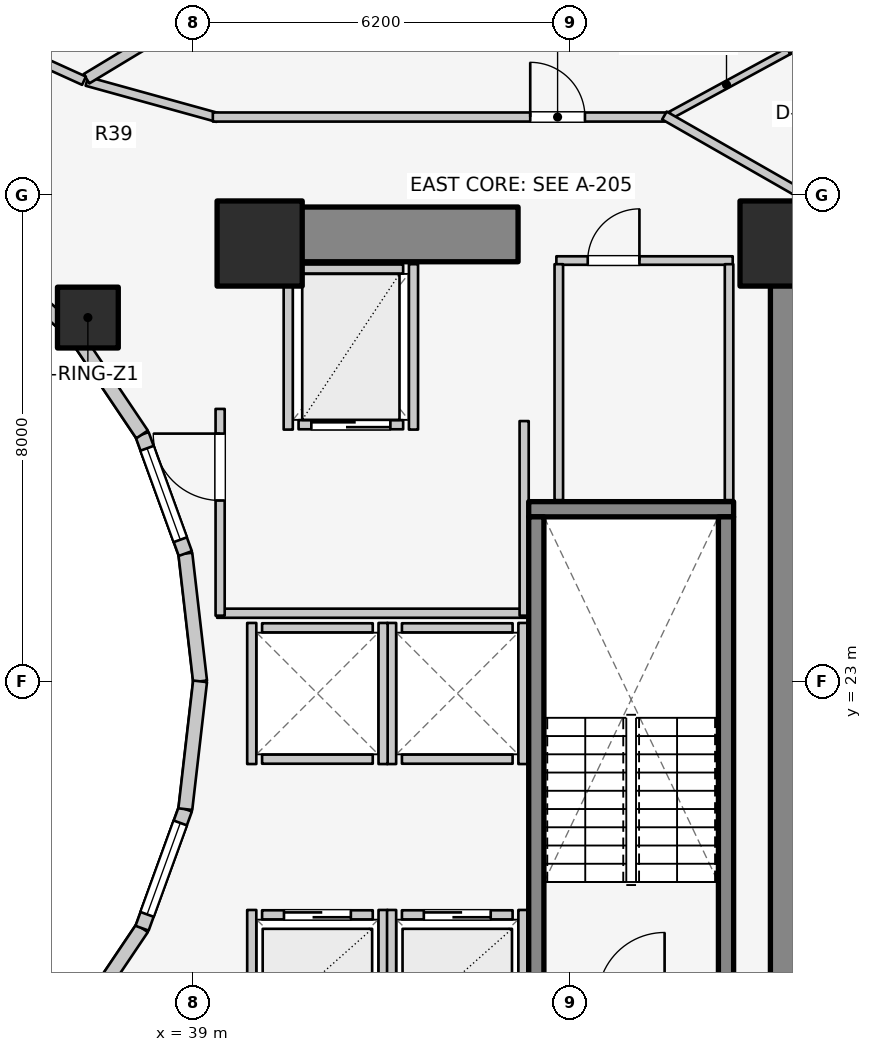
"""IFC4 building model, lengths in metres.
Left out: names, types, materials, properties, quantities, classifications, styles, units other than length and angle.
Written with IfcOpenShell. Run it as: python <this file> out.ifc"""

import sys

from ifc_helpers import new_model, si_unit, direction, frame, frame_2d, origin, origin_2d, place, context, subcontext, project, spatial, rectangle, extrude, element, fill, save


model = new_model("IFC4")
c1 = context("Model", 3, precision=1e-05, world=origin(), true_north=direction((0.0, 1.0)))
c2 = subcontext(c1, "Body", "Model", "MODEL_VIEW")
j1 = project(units=[si_unit("LENGTHUNIT", "METRE"), si_unit("PLANEANGLEUNIT", "RADIAN")], contexts=[c1])
p1 = place(None, origin())
s1 = spatial("IfcSite", under=j1, at=p1, CompositionType="ELEMENT")
p2 = place(p1, origin())
s2 = spatial("IfcBuilding", under=s1, at=p2, CompositionType="ELEMENT")
p3 = place(p2, frame((0.0, 0.0, 58.6)))
s3 = spatial("IfcBuildingStorey", under=s2, at=p3, CompositionType="ELEMENT", Elevation=58.6)
p4 = place(p3, frame((48.95, 17.05, 0.0), z_axis=(0.0, 0.0, 1.0), x_axis=(0.0, 1.0, 0.0)))
e1 = element("IfcWall", 1, at=p4, inside=s3, PredefinedType="SHEAR", context=c2, shape_type="SweptSolid", body=[
    extrude(rectangle(XDim=12.8, YDim=0.9, at=frame_2d((6.4, 0.0))), origin(), (0.0, 0.0, 1.0), 3.1),
])
p5 = place(p3, frame((39.85, 30.35, 0.0), z_axis=(0.0, 0.0, 1.0), x_axis=(1.0, 0.0, 0.0)))
e2 = element("IfcWall", 2, at=p5, inside=s3, PredefinedType="SHEAR", context=c2, shape_type="SweptSolid", body=[
    extrude(rectangle(XDim=4.5, YDim=0.9, at=frame_2d((2.25, 0.0))), origin(), (0.0, 0.0, 1.0), 3.1),
])
p6 = place(p3, frame((44.525, 25.83, 0.0), z_axis=(0.0, 0.0, 1.0), x_axis=(1.0, 0.0, 0.0)))
e3 = element("IfcWall", 3, at=p6, inside=s3, PredefinedType="SOLIDWALL", context=c2, shape_type="SweptSolid", body=[
    extrude(rectangle(XDim=3.37, YDim=0.25, at=frame_2d((1.685, 0.0))), origin(), (0.0, 0.0, 1.0), 3.1),
])
for number, where, z_axis, x_axis in (
    (4, (44.65, 17.895, 0.0), (0.0, 0.0, 1.0), (0.0, 1.0, 0.0)),
    (5, (47.77, 17.895, 0.0), (0.0, 0.0, 1.0), (0.0, 1.0, 0.0)),
):
    element("IfcWall", number, at=place(p3, frame(where, z_axis=z_axis, x_axis=x_axis)), inside=s3, PredefinedType="SOLIDWALL", context=c2, shape_type="SweptSolid", body=[
        extrude(rectangle(XDim=7.81, YDim=0.25, at=frame_2d((3.905, 0.0))), origin(), (0.0, 0.0, 1.0), 3.1),
    ])
for number, where, z_axis, x_axis in (
    (6, (48.7, 30.2, 0.0), (0.0, 0.0, 1.0), (1.0, 0.0, 0.0)),
    (7, (40.1, 30.2, 0.0), (0.0, 0.0, 1.0), (1.0, 0.0, 0.0)),
):
    element("IfcColumn", number, at=place(p3, frame(where, z_axis=z_axis, x_axis=x_axis)), inside=s3, PredefinedType="COLUMN", context=c2, shape_type="SweptSolid", body=[
        extrude(rectangle(XDim=1.4, YDim=1.4, at=origin_2d()), origin(), (0.0, 0.0, 1.0), 3.1),
    ])
p7 = place(p3, frame((37.275, 28.982, 0.0), z_axis=(0.0, 0.0, 1.0), x_axis=(1.0, 0.0, 0.0)))
e8 = element("IfcColumn", 8, at=p7, inside=s3, PredefinedType="COLUMN", context=c2, shape_type="SweptSolid", body=[
    extrude(rectangle(XDim=1.0, YDim=1.0, at=origin_2d()), origin(), (0.0, 0.0, 1.0), 3.1),
])
p8 = place(p3, frame((39.12, 23.0, 0.0), z_axis=(0.0, 0.0, 1.0), x_axis=(-0.114711713601, 0.993398823617, 0.0)))
e9 = element("IfcWall", 9, at=p8, inside=s3, PredefinedType="STANDARD", context=c2, shape_type="SweptSolid", body=[
    extrude(rectangle(XDim=2.115, YDim=0.23, at=frame_2d((1.058, 0.0))), origin(), (0.0, 0.0, 1.0), 2.84),
])
p9 = place(p3, frame((38.877, 25.102, 0.0), z_axis=(0.0, 0.0, 1.0), x_axis=(-0.341423187295, 0.93990968033, 0.0)))
e10 = element("IfcWall", 10, at=p9, inside=s3, PredefinedType="STANDARD", context=c2, shape_type="SweptSolid", body=[
    extrude(rectangle(XDim=2.084, YDim=0.23, at=frame_2d((1.042, 0.0))), origin(), (0.0, 0.0, 1.0), 2.84),
])
p10 = place(p9, frame((0.242, 0.0, 0.85)))
e11 = element("IfcOpeningElement", 11, at=p10, cuts=e10, PredefinedType="OPENING", context=c2, shape_type="SweptSolid", body=[
    extrude(rectangle(XDim=1.6, YDim=1.65, at=frame_2d((0.8, 0.825))), frame((0.0, 0.125, 0.0), z_axis=(0.0, -1.0, 0.0), x_axis=(1.0, 0.0, 0.0)), (0.0, 0.0, 1.0), 0.25),
])
p11 = place(p3, frame((38.166, 27.06, 0.0), z_axis=(0.0, 0.0, 1.0), x_axis=(-0.558197800898, 0.829707909492, 0.0)))
e12 = element("IfcWall", 12, at=p11, inside=s3, PredefinedType="STANDARD", context=c2, shape_type="SweptSolid", body=[
    extrude(rectangle(XDim=2.027, YDim=0.23, at=frame_2d((1.013, 0.0))), origin(), (0.0, 0.0, 1.0), 2.16),
])
p12 = place(p3, frame((37.035, 28.742, 0.0), z_axis=(0.0, 0.0, 1.0), x_axis=(-0.752576694707, 0.658504607869, 0.0)))
e13 = element("IfcWall", 13, at=p12, inside=s3, PredefinedType="STANDARD", context=c2, shape_type="SweptSolid", body=[
    extrude(rectangle(XDim=1.959, YDim=0.23, at=frame_2d((0.98, 0.0))), origin(), (0.0, 0.0, 1.0), 2.16),
])
p13 = place(p3, frame((37.035, 17.258, 0.0), z_axis=(0.0, 0.0, 1.0), x_axis=(0.558197800898, 0.829707909492, 0.0)))
e14 = element("IfcWall", 14, at=p13, inside=s3, PredefinedType="STANDARD", context=c2, shape_type="SweptSolid", body=[
    extrude(rectangle(XDim=2.027, YDim=0.23, at=frame_2d((1.013, 0.0))), origin(), (0.0, 0.0, 1.0), 2.16),
])
p14 = place(p3, frame((38.166, 18.94, 0.0), z_axis=(0.0, 0.0, 1.0), x_axis=(0.341423187295, 0.93990968033, 0.0)))
e15 = element("IfcWall", 15, at=p14, inside=s3, PredefinedType="STANDARD", context=c2, shape_type="SweptSolid", body=[
    extrude(rectangle(XDim=2.084, YDim=0.23, at=frame_2d((1.042, 0.0))), origin(), (0.0, 0.0, 1.0), 2.84),
])
p15 = place(p14, frame((0.242, 0.0, 0.85)))
e16 = element("IfcOpeningElement", 16, at=p15, cuts=e15, PredefinedType="OPENING", context=c2, shape_type="SweptSolid", body=[
    extrude(rectangle(XDim=1.6, YDim=1.65, at=frame_2d((0.8, 0.825))), frame((0.0, 0.125, 0.0), z_axis=(0.0, -1.0, 0.0), x_axis=(1.0, 0.0, 0.0)), (0.0, 0.0, 1.0), 0.25),
])
p16 = place(p3, frame((38.877, 20.898, 0.0), z_axis=(0.0, 0.0, 1.0), x_axis=(0.114711713601, 0.993398823617, 0.0)))
e17 = element("IfcWall", 17, at=p16, inside=s3, PredefinedType="STANDARD", context=c2, shape_type="SweptSolid", body=[
    extrude(rectangle(XDim=2.115, YDim=0.23, at=frame_2d((1.058, 0.0))), origin(), (0.0, 0.0, 1.0), 2.84),
])
p17 = place(p3, frame((40.14, 19.16, 0.0), z_axis=(0.0, 0.0, 1.0), x_axis=(1.0, 0.0, 0.0)))
e18 = element("IfcWall", 18, at=p17, inside=s3, PredefinedType="SOLIDWALL", context=c2, shape_type="SweptSolid", body=[
    extrude(rectangle(XDim=1.82, YDim=0.15, at=frame_2d((0.91, 0.0))), origin(), (0.0, 0.0, 1.0), 2.12),
])
p18 = place(p17, frame((0.36, 0.0, 0.0)))
e19 = element("IfcOpeningElement", 19, at=p18, cuts=e18, PredefinedType="OPENING", context=c2, shape_type="SweptSolid", body=[
    extrude(rectangle(XDim=1.1, YDim=2.1, at=frame_2d((0.55, 1.05))), frame((0.0, 0.085, 0.0), z_axis=(0.0, -1.0, 0.0), x_axis=(1.0, 0.0, 0.0)), (0.0, 0.0, 1.0), 0.17),
])
p19 = place(p3, frame((39.97, 17.02, 0.0), z_axis=(0.0, 0.0, 1.0), x_axis=(0.0, 1.0, 0.0)))
e20 = element("IfcWall", 20, at=p19, inside=s3, PredefinedType="SOLIDWALL", context=c2, shape_type="SweptSolid", body=[
    extrude(rectangle(XDim=2.22, YDim=0.15, at=frame_2d((1.11, 0.0))), origin(), (0.0, 0.0, 1.0), 2.12),
])
p20 = place(p3, frame((42.13, 17.02, 0.0), z_axis=(0.0, 0.0, 1.0), x_axis=(0.0, 1.0, 0.0)))
e21 = element("IfcWall", 21, at=p20, inside=s3, PredefinedType="SOLIDWALL", context=c2, shape_type="SweptSolid", body=[
    extrude(rectangle(XDim=2.22, YDim=0.15, at=frame_2d((1.11, 0.0))), origin(), (0.0, 0.0, 1.0), 2.855),
])
p21 = place(p3, frame((42.44, 19.16, 0.0), z_axis=(0.0, 0.0, 1.0), x_axis=(1.0, 0.0, 0.0)))
e22 = element("IfcWall", 22, at=p21, inside=s3, PredefinedType="SOLIDWALL", context=c2, shape_type="SweptSolid", body=[
    extrude(rectangle(XDim=1.82, YDim=0.15, at=frame_2d((0.91, 0.0))), origin(), (0.0, 0.0, 1.0), 2.855),
])
p22 = place(p21, frame((0.36, 0.0, 0.0)))
e23 = element("IfcOpeningElement", 23, at=p22, cuts=e22, PredefinedType="OPENING", context=c2, shape_type="SweptSolid", body=[
    extrude(rectangle(XDim=1.1, YDim=2.1, at=frame_2d((0.55, 1.05))), frame((0.0, 0.085, 0.0), z_axis=(0.0, -1.0, 0.0), x_axis=(1.0, 0.0, 0.0)), (0.0, 0.0, 1.0), 0.17),
])
p23 = place(p3, frame((42.27, 17.02, 0.0), z_axis=(0.0, 0.0, 1.0), x_axis=(0.0, 1.0, 0.0)))
e24 = element("IfcWall", 24, at=p23, inside=s3, PredefinedType="SOLIDWALL", context=c2, shape_type="SweptSolid", body=[
    extrude(rectangle(XDim=2.22, YDim=0.15, at=frame_2d((1.11, 0.0))), origin(), (0.0, 0.0, 1.0), 2.855),
])
p24 = place(p3, frame((44.43, 17.02, 0.0), z_axis=(0.0, 0.0, 1.0), x_axis=(0.0, 1.0, 0.0)))
e25 = element("IfcWall", 25, at=p24, inside=s3, PredefinedType="SOLIDWALL", context=c2, shape_type="SweptSolid", body=[
    extrude(rectangle(XDim=2.22, YDim=0.15, at=frame_2d((1.11, 0.0))), origin(), (0.0, 0.0, 1.0), 2.12),
])
for number, where, z_axis, x_axis in (
    (26, (42.44, 21.72, 0.0), (0.0, 0.0, 1.0), (1.0, 0.0, 0.0)),
    (27, (42.44, 23.88, 0.0), (0.0, 0.0, 1.0), (1.0, 0.0, 0.0)),
):
    element("IfcWall", number, at=place(p3, frame(where, z_axis=z_axis, x_axis=x_axis)), inside=s3, PredefinedType="SOLIDWALL", context=c2, shape_type="SweptSolid", body=[
        extrude(rectangle(XDim=1.82, YDim=0.15, at=frame_2d((0.91, 0.0))), origin(), (0.0, 0.0, 1.0), 2.855),
    ])
for number, where, z_axis, x_axis in (
    (28, (42.27, 21.64, 0.0), (0.0, 0.0, 1.0), (0.0, 1.0, 0.0)),
    (29, (44.43, 21.64, 0.0), (0.0, 0.0, 1.0), (0.0, 1.0, 0.0)),
):
    element("IfcWall", number, at=place(p3, frame(where, z_axis=z_axis, x_axis=x_axis)), inside=s3, PredefinedType="SOLIDWALL", context=c2, shape_type="SweptSolid", body=[
        extrude(rectangle(XDim=2.32, YDim=0.15, at=frame_2d((1.16, 0.0))), origin(), (0.0, 0.0, 1.0), 2.855),
    ])
for number, where, z_axis, x_axis in (
    (30, (40.14, 21.72, 0.0), (0.0, 0.0, 1.0), (1.0, 0.0, 0.0)),
    (31, (40.14, 23.88, 0.0), (0.0, 0.0, 1.0), (1.0, 0.0, 0.0)),
):
    element("IfcWall", number, at=place(p3, frame(where, z_axis=z_axis, x_axis=x_axis)), inside=s3, PredefinedType="SOLIDWALL", context=c2, shape_type="SweptSolid", body=[
        extrude(rectangle(XDim=1.82, YDim=0.15, at=frame_2d((0.91, 0.0))), origin(), (0.0, 0.0, 1.0), 2.12),
    ])
p25 = place(p3, frame((39.97, 21.64, 0.0), z_axis=(0.0, 0.0, 1.0), x_axis=(0.0, 1.0, 0.0)))
e32 = element("IfcWall", 32, at=p25, inside=s3, PredefinedType="SOLIDWALL", context=c2, shape_type="SweptSolid", body=[
    extrude(rectangle(XDim=2.32, YDim=0.15, at=frame_2d((1.16, 0.0))), origin(), (0.0, 0.0, 1.0), 2.12),
])
p26 = place(p3, frame((42.13, 21.64, 0.0), z_axis=(0.0, 0.0, 1.0), x_axis=(0.0, 1.0, 0.0)))
e33 = element("IfcWall", 33, at=p26, inside=s3, PredefinedType="SOLIDWALL", context=c2, shape_type="SweptSolid", body=[
    extrude(rectangle(XDim=2.32, YDim=0.15, at=frame_2d((1.16, 0.0))), origin(), (0.0, 0.0, 1.0), 2.855),
])
p27 = place(p3, frame((40.74, 27.22, 0.0), z_axis=(0.0, 0.0, 1.0), x_axis=(1.0, 0.0, 0.0)))
e34 = element("IfcWall", 34, at=p27, inside=s3, PredefinedType="SOLIDWALL", context=c2, shape_type="SweptSolid", body=[
    extrude(rectangle(XDim=1.72, YDim=0.15, at=frame_2d((0.86, 0.0))), origin(), (0.0, 0.0, 1.0), 2.855),
])
p28 = place(p27, frame((0.21, 0.0, 0.0)))
e35 = element("IfcOpeningElement", 35, at=p28, cuts=e34, PredefinedType="OPENING", context=c2, shape_type="SweptSolid", body=[
    extrude(rectangle(XDim=1.3, YDim=2.1, at=frame_2d((0.65, 1.05))), frame((0.0, 0.085, 0.0), z_axis=(0.0, -1.0, 0.0), x_axis=(1.0, 0.0, 0.0)), (0.0, 0.0, 1.0), 0.17),
])
p29 = place(p3, frame((40.74, 29.78, 0.0), z_axis=(0.0, 0.0, 1.0), x_axis=(1.0, 0.0, 0.0)))
e36 = element("IfcWall", 36, at=p29, inside=s3, PredefinedType="SOLIDWALL", context=c2, shape_type="SweptSolid", body=[
    extrude(rectangle(XDim=1.72, YDim=0.15, at=frame_2d((0.86, 0.0))), origin(), (0.0, 0.0, 1.0), 2.855),
])
for number, where, z_axis, x_axis in (
    (37, (40.57, 27.14, 0.0), (0.0, 0.0, 1.0), (0.0, 1.0, 0.0)),
    (38, (42.63, 27.14, 0.0), (0.0, 0.0, 1.0), (0.0, 1.0, 0.0)),
):
    element("IfcWall", number, at=place(p3, frame(where, z_axis=z_axis, x_axis=x_axis)), inside=s3, PredefinedType="SOLIDWALL", context=c2, shape_type="SweptSolid", body=[
        extrude(rectangle(XDim=2.72, YDim=0.15, at=frame_2d((1.36, 0.0))), origin(), (0.0, 0.0, 1.0), 2.855),
    ])
p30 = place(p3, frame((39.4, 24.12, 0.0), z_axis=(0.0, 0.0, 1.0), x_axis=(1.0, 0.0, 0.0)))
e39 = element("IfcWall", 39, at=p30, inside=s3, PredefinedType="PARTITIONING", context=c2, shape_type="SweptSolid", body=[
    extrude(rectangle(XDim=5.08, YDim=0.15, at=frame_2d((2.54, 0.0))), origin(), (0.0, 0.0, 1.0), 2.12),
])
p31 = place(p3, frame((44.45, 24.08, 0.0), z_axis=(0.0, 0.0, 1.0), x_axis=(0.0, 1.0, 0.0)))
e40 = element("IfcWall", 40, at=p31, inside=s3, PredefinedType="PARTITIONING", context=c2, shape_type="SweptSolid", body=[
    extrude(rectangle(XDim=3.2, YDim=0.15, at=frame_2d((1.6, 0.0))), origin(), (0.0, 0.0, 1.0), 2.855),
])
p32 = place(p3, frame((39.45, 24.08, 0.0), z_axis=(0.0, 0.0, 1.0), x_axis=(0.0, 1.0, 0.0)))
e41 = element("IfcWall", 41, at=p32, inside=s3, PredefinedType="PARTITIONING", context=c2, shape_type="SweptSolid", body=[
    extrude(rectangle(XDim=3.4, YDim=0.15, at=frame_2d((1.7, 0.0))), origin(), (0.0, 0.0, 1.0), 2.855),
])
p33 = place(p32, frame((1.894, 0.0, 0.0)))
e42 = element("IfcOpeningElement", 42, at=p33, cuts=e41, PredefinedType="OPENING", context=c2, shape_type="SweptSolid", body=[
    extrude(rectangle(XDim=1.1, YDim=2.1, at=frame_2d((0.55, 1.05))), frame((0.0, 0.085, 0.0), z_axis=(0.0, -1.0, 0.0), x_axis=(1.0, 0.0, 0.0)), (0.0, 0.0, 1.0), 0.17),
])
p34 = place(p3, frame((44.98, 29.92, 0.0), z_axis=(0.0, 0.0, 1.0), x_axis=(1.0, 0.0, 0.0)))
e43 = element("IfcWall", 43, at=p34, inside=s3, PredefinedType="PLUMBINGWALL", context=c2, shape_type="SweptSolid", body=[
    extrude(rectangle(XDim=2.9, YDim=0.14, at=frame_2d((1.45, 0.0))), origin(), (0.0, 0.0, 1.0), 2.855),
])
p35 = place(p34, frame((0.516, 0.0, 0.0)))
e44 = element("IfcOpeningElement", 44, at=p35, cuts=e43, PredefinedType="OPENING", context=c2, shape_type="SweptSolid", body=[
    extrude(rectangle(XDim=0.85, YDim=2.05, at=frame_2d((0.425, 1.025))), frame((0.0, 0.08, 0.0), z_axis=(0.0, -1.0, 0.0), x_axis=(1.0, 0.0, 0.0)), (0.0, 0.0, 1.0), 0.16),
])
for number, where, z_axis, x_axis in (
    (45, (45.02, 25.98, 0.0), (0.0, 0.0, 1.0), (0.0, 1.0, 0.0)),
    (46, (47.82, 25.98, 0.0), (0.0, 0.0, 1.0), (0.0, 1.0, 0.0)),
):
    element("IfcWall", number, at=place(p3, frame(where, z_axis=z_axis, x_axis=x_axis)), inside=s3, PredefinedType="PLUMBINGWALL", context=c2, shape_type="SweptSolid", body=[
        extrude(rectangle(XDim=3.88, YDim=0.14, at=frame_2d((1.94, 0.0))), origin(), (0.0, 0.0, 1.0), 2.855),
    ])
p36 = place(p3, frame((46.756, 32.256, 0.0), z_axis=(0.0, 0.0, 1.0), x_axis=(0.878580476603, 0.477594332181, 0.0)))
e47 = element("IfcWall", 47, at=p36, inside=s3, PredefinedType="MOVABLE", context=c2, shape_type="SweptSolid", body=[
    extrude(rectangle(XDim=2.326, YDim=0.12, at=frame_2d((1.163, 0.0))), origin(), (0.0, 0.0, 1.0), 2.855),
])
p37 = place(p3, frame((48.8, 33.367, 0.0), z_axis=(0.0, 0.0, 1.0), x_axis=(0.878540750178, 0.4776674055, 0.0)))
e48 = element("IfcWall", 48, at=p37, inside=s3, PredefinedType="MOVABLE", context=c2, shape_type="SweptSolid", body=[
    extrude(rectangle(XDim=1.17, YDim=0.12, at=frame_2d((0.585, 0.0))), origin(), (0.0, 0.0, 1.0), 2.11),
])
p38 = place(p37, frame((0.16, 0.0, 0.0)))
e49 = element("IfcOpeningElement", 49, at=p38, cuts=e48, PredefinedType="OPENING", context=c2, shape_type="SweptSolid", body=[
    extrude(rectangle(XDim=0.85, YDim=2.05, at=frame_2d((0.425, 1.025))), frame((0.0, 0.07, 0.0), z_axis=(0.0, -1.0, 0.0), x_axis=(1.0, 0.0, 0.0)), (0.0, 0.0, 1.0), 0.14),
])
p39 = place(p3, frame((37.258, 32.867, 0.0), z_axis=(0.0, 0.0, 1.0), x_axis=(0.963833843713, -0.266503886865, 0.0)))
e50 = element("IfcWall", 50, at=p39, inside=s3, PredefinedType="PARTITIONING", context=c2, shape_type="SweptSolid", body=[
    extrude(rectangle(XDim=2.232, YDim=0.15, at=frame_2d((1.116, 0.0))), origin(), (0.0, 0.0, 1.0), 2.237),
])
p40 = place(p3, frame((39.33, 32.28, 0.0), z_axis=(0.0, 0.0, 1.0), x_axis=(1.0, 0.0, 0.0)))
e51 = element("IfcWall", 51, at=p40, inside=s3, PredefinedType="PARTITIONING", context=c2, shape_type="SweptSolid", body=[
    extrude(rectangle(XDim=7.52, YDim=0.15, at=frame_2d((3.76, 0.0))), origin(), (0.0, 0.0, 1.0), 2.237),
])
p41 = place(p40, frame((5.22, 0.0, 0.0)))
e52 = element("IfcOpeningElement", 52, at=p41, cuts=e51, PredefinedType="OPENING", context=c2, shape_type="SweptSolid", body=[
    extrude(rectangle(XDim=0.9, YDim=2.1, at=frame_2d((0.45, 1.05))), frame((0.0, 0.085, 0.0), z_axis=(0.0, -1.0, 0.0), x_axis=(1.0, 0.0, 0.0)), (0.0, 0.0, 1.0), 0.17),
])
p42 = place(p3, frame((46.757, 32.305, 0.0), z_axis=(0.0, 0.0, 1.0), x_axis=(0.867991349648, -0.496579315857, 0.0)))
e53 = element("IfcWall", 53, at=p42, inside=s3, PredefinedType="PARTITIONING", context=c2, shape_type="SweptSolid", body=[
    extrude(rectangle(XDim=2.567, YDim=0.15, at=frame_2d((1.283, 0.0))), origin(), (0.0, 0.0, 1.0), 2.069),
])
p43 = place(p3, frame((37.252, 32.91, 0.0), z_axis=(0.0, 0.0, 1.0), x_axis=(0.855817136021, 0.517278483694, 0.0)))
e54 = element("IfcWall", 54, at=p43, inside=s3, PredefinedType="PARTITIONING", context=c2, shape_type="SweptSolid", body=[
    extrude(rectangle(XDim=9.564, YDim=0.18, at=frame_2d((4.782, 0.0))), origin(), (0.0, 0.0, 1.0), 2.237),
])
p44 = place(p3, frame((37.211, 32.877, 0.0), z_axis=(0.0, 0.0, 1.0), x_axis=(-0.910568469686, 0.41335827319, 0.0)))
e55 = element("IfcWall", 55, at=p44, inside=s3, PredefinedType="PARTITIONING", context=c2, shape_type="SweptSolid", body=[
    extrude(rectangle(XDim=2.772, YDim=0.15, at=frame_2d((1.386, 0.0))), origin(), (0.0, 0.0, 1.0), 2.237),
])
p45 = place(p44, frame((0.911, 0.0, 0.0)))
e56 = element("IfcOpeningElement", 56, at=p45, cuts=e55, PredefinedType="OPENING", context=c2, shape_type="SweptSolid", body=[
    extrude(rectangle(XDim=0.95, YDim=2.1, at=frame_2d((0.475, 1.05))), frame((0.0, 0.085, 0.0), z_axis=(0.0, -1.0, 0.0), x_axis=(1.0, 0.0, 0.0)), (0.0, 0.0, 1.0), 0.17),
])
p46 = place(p10, origin())
e57 = element("IfcWindow", 57, at=p46, inside=s3, PartitioningType="SINGLE_PANEL", PredefinedType="WINDOW", context=c2, shape_type="SweptSolid", body=[
    extrude(rectangle(XDim=1.6, YDim=1.65, at=frame_2d((0.8, 0.825))), frame((0.0, 0.03, 0.0), z_axis=(0.0, -1.0, 0.0), x_axis=(1.0, 0.0, 0.0)), (0.0, 0.0, 1.0), 0.06),
])
fill(e11, e57)
p47 = place(p15, origin())
e58 = element("IfcWindow", 58, at=p47, inside=s3, PartitioningType="SINGLE_PANEL", PredefinedType="WINDOW", context=c2, shape_type="SweptSolid", body=[
    extrude(rectangle(XDim=1.6, YDim=1.65, at=frame_2d((0.8, 0.825))), frame((0.0, 0.03, 0.0), z_axis=(0.0, -1.0, 0.0), x_axis=(1.0, 0.0, 0.0)), (0.0, 0.0, 1.0), 0.06),
])
fill(e16, e58)
p48 = place(p18, origin())
e59 = element("IfcDoor", 59, at=p48, inside=s3, OperationType="DOUBLE_DOOR_SLIDING", PredefinedType="DOOR", context=c2, shape_type="SweptSolid", body=[
    extrude(rectangle(XDim=1.1, YDim=2.1, at=frame_2d((0.55, 1.05))), frame((0.0, 0.025, 0.0), z_axis=(0.0, -1.0, 0.0), x_axis=(1.0, 0.0, 0.0)), (0.0, 0.0, 1.0), 0.05),
])
fill(e19, e59)
p49 = place(p22, origin())
e60 = element("IfcDoor", 60, at=p49, inside=s3, OperationType="DOUBLE_DOOR_SLIDING", PredefinedType="DOOR", context=c2, shape_type="SweptSolid", body=[
    extrude(rectangle(XDim=1.1, YDim=2.1, at=frame_2d((0.55, 1.05))), frame((0.0, 0.025, 0.0), z_axis=(0.0, -1.0, 0.0), x_axis=(1.0, 0.0, 0.0)), (0.0, 0.0, 1.0), 0.05),
])
fill(e23, e60)
p50 = place(p28, origin())
e61 = element("IfcDoor", 61, at=p50, inside=s3, OperationType="DOUBLE_DOOR_SLIDING", PredefinedType="DOOR", context=c2, shape_type="SweptSolid", body=[
    extrude(rectangle(XDim=1.3, YDim=2.1, at=frame_2d((0.65, 1.05))), frame((0.0, 0.025, 0.0), z_axis=(0.0, -1.0, 0.0), x_axis=(1.0, 0.0, 0.0)), (0.0, 0.0, 1.0), 0.05),
])
fill(e35, e61)
p51 = place(p33, origin())
e62 = element("IfcDoor", 62, at=p51, inside=s3, OperationType="SINGLE_SWING_RIGHT", PredefinedType="DOOR", context=c2, shape_type="SweptSolid", body=[
    extrude(rectangle(XDim=1.1, YDim=2.1, at=frame_2d((0.55, 1.05))), frame((0.0, 0.025, 0.0), z_axis=(0.0, -1.0, 0.0), x_axis=(1.0, 0.0, 0.0)), (0.0, 0.0, 1.0), 0.05),
])
fill(e42, e62)
p52 = place(p35, origin())
e63 = element("IfcDoor", 63, at=p52, inside=s3, OperationType="SINGLE_SWING_RIGHT", PredefinedType="DOOR", context=c2, shape_type="SweptSolid", body=[
    extrude(rectangle(XDim=0.85, YDim=2.05, at=frame_2d((0.425, 1.025))), frame((0.0, 0.025, 0.0), z_axis=(0.0, -1.0, 0.0), x_axis=(1.0, 0.0, 0.0)), (0.0, 0.0, 1.0), 0.05),
])
fill(e44, e63)
p53 = place(p41, origin())
e64 = element("IfcDoor", 64, at=p53, inside=s3, OperationType="SINGLE_SWING_LEFT", PredefinedType="DOOR", context=c2, shape_type="SweptSolid", body=[
    extrude(rectangle(XDim=0.9, YDim=2.1, at=frame_2d((0.45, 1.05))), frame((0.0, 0.025, 0.0), z_axis=(0.0, -1.0, 0.0), x_axis=(1.0, 0.0, 0.0)), (0.0, 0.0, 1.0), 0.05),
])
fill(e52, e64)
save(model, sys.argv[1])
